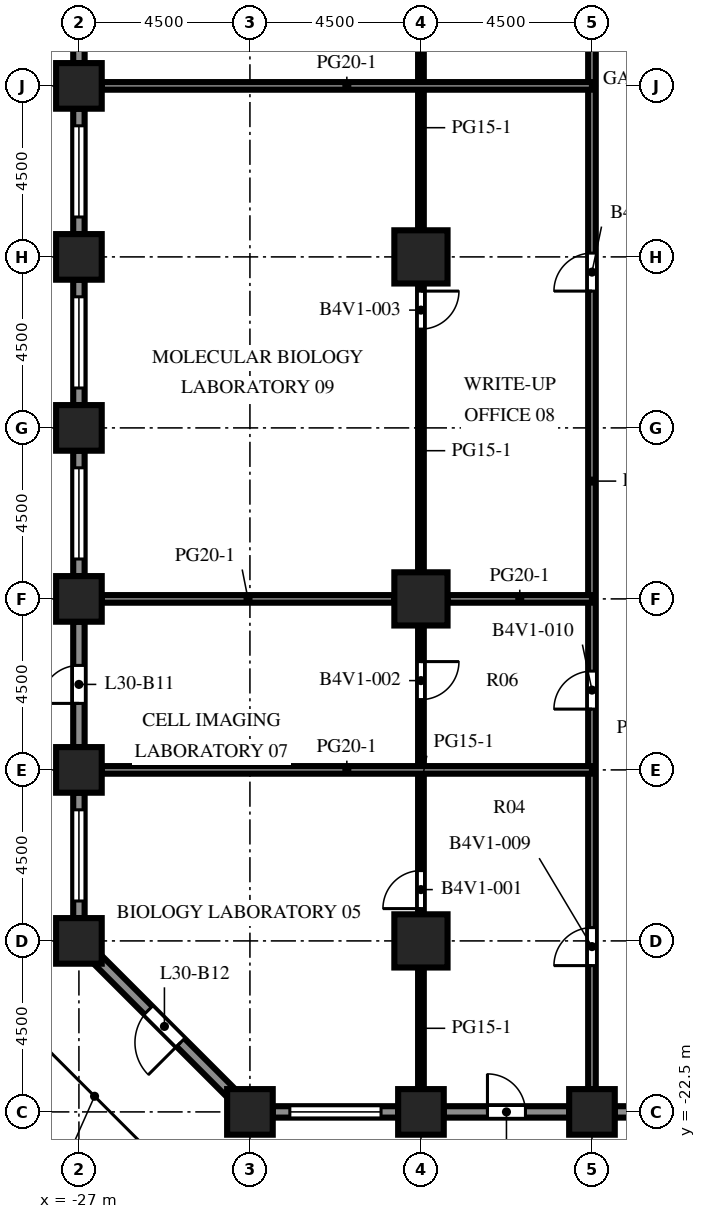
"""IFC4 building model, lengths in metres.
Left out: names, types, materials, properties, quantities, classifications, styles, units other than length and angle.
Written with IfcOpenShell. Run it as: python <this file> out.ifc"""

import sys

from ifc_helpers import new_model, si_unit, direction, frame, frame_2d, origin, origin_2d, place, context, subcontext, project, spatial, rectangle, extrude, element, fill, save


model = new_model("IFC4")
c1 = context("Model", 3, precision=1e-05, world=origin(), true_north=direction((0.0, 1.0)))
c2 = subcontext(c1, "Body", "Model", "MODEL_VIEW")
j1 = project(units=[si_unit("LENGTHUNIT", "METRE"), si_unit("PLANEANGLEUNIT", "RADIAN")], contexts=[c1])
p1 = place(None, origin())
s1 = spatial("IfcSite", under=j1, at=p1, CompositionType="ELEMENT")
p2 = place(p1, origin())
s2 = spatial("IfcBuilding", under=s1, at=p2, CompositionType="ELEMENT")
p3 = place(p2, frame((0.0, 0.0, 133.1)))
s3 = spatial("IfcBuildingStorey", under=s2, at=p3, CompositionType="ELEMENT", Elevation=133.1)
for number, where, z_axis, x_axis in (
    (1, (-27.0, -18.0, 0.0), (0.0, 0.0, 1.0), (1.0, 0.0, 0.0)),
    (2, (-27.0, -13.5, 0.0), (0.0, 0.0, 1.0), (1.0, 0.0, 0.0)),
    (3, (-27.0, -9.0, 0.0), (0.0, 0.0, 1.0), (1.0, 0.0, 0.0)),
    (4, (-27.0, -4.5, 0.0), (0.0, 0.0, 1.0), (1.0, 0.0, 0.0)),
    (5, (-27.0, 0.0, 0.0), (0.0, 0.0, 1.0), (1.0, 0.0, 0.0)),
    (6, (-27.0, 4.5, 0.0), (0.0, 0.0, 1.0), (1.0, 0.0, 0.0)),
    (7, (-22.5, -22.5, 0.0), (0.0, 0.0, 1.0), (1.0, 0.0, 0.0)),
    (8, (-18.0, -22.5, 0.0), (0.0, 0.0, 1.0), (1.0, 0.0, 0.0)),
    (9, (-13.5, -22.5, 0.0), (0.0, 0.0, 1.0), (1.0, 0.0, 0.0)),
):
    element("IfcColumn", number, at=place(p3, frame(where, z_axis=z_axis, x_axis=x_axis)), inside=s3, PredefinedType="COLUMN", context=c2, shape_type="SweptSolid", body=[
        extrude(rectangle(XDim=1.2, YDim=1.2, at=origin_2d()), origin(), (0.0, 0.0, 1.0), 4.1),
    ])
for number, where, z_axis, x_axis in (
    (10, (-18.0, -18.0, 0.0), (0.0, 0.0, 1.0), (1.0, 0.0, 0.0)),
    (11, (-18.0, -9.0, 0.0), (0.0, 0.0, 1.0), (1.0, 0.0, 0.0)),
    (12, (-18.0, 0.0, 0.0), (0.0, 0.0, 1.0), (1.0, 0.0, 0.0)),
):
    element("IfcColumn", number, at=place(p3, frame(where, z_axis=z_axis, x_axis=x_axis)), inside=s3, PredefinedType="COLUMN", context=c2, shape_type="SweptSolid", body=[
        extrude(rectangle(XDim=1.4, YDim=1.4, at=origin_2d()), origin(), (0.0, 0.0, 1.0), 4.1),
    ])
p4 = place(p3, frame((-18.6, -22.5, 0.0), z_axis=(0.0, 0.0, 1.0), x_axis=(-1.0, 0.0, 0.0)))
e13 = element("IfcWall", 13, at=p4, inside=s3, PredefinedType="SOLIDWALL", context=c2, shape_type="SweptSolid", body=[
    extrude(rectangle(XDim=3.3, YDim=0.3, at=frame_2d((1.65, 0.0))), origin(), (0.0, 0.0, 1.0), 2.75),
])
p5 = place(p4, frame((0.45, 0.0, 0.8)))
e14 = element("IfcOpeningElement", 14, at=p5, cuts=e13, PredefinedType="OPENING", context=c2, shape_type="SweptSolid", body=[
    extrude(rectangle(XDim=2.4, YDim=1.7, at=frame_2d((1.2, 0.85))), frame((0.0, 0.16, 0.0), z_axis=(0.0, -1.0, 0.0), x_axis=(1.0, 0.0, 0.0)), (0.0, 0.0, 1.0), 0.32),
])
p6 = place(p3, frame((-14.1, -22.5, 0.0), z_axis=(0.0, 0.0, 1.0), x_axis=(-1.0, 0.0, 0.0)))
e15 = element("IfcWall", 15, at=p6, inside=s3, PredefinedType="SOLIDWALL", context=c2, shape_type="SweptSolid", body=[
    extrude(rectangle(XDim=3.3, YDim=0.3, at=frame_2d((1.65, 0.0))), origin(), (0.0, 0.0, 1.0), 2.75),
])
p7 = place(p6, frame((1.15, 0.0, 0.0)))
e16 = element("IfcOpeningElement", 16, at=p7, cuts=e15, PredefinedType="OPENING", context=c2, shape_type="SweptSolid", body=[
    extrude(rectangle(XDim=1.0, YDim=2.2, at=frame_2d((0.5, 1.1))), frame((0.0, 0.16, 0.0), z_axis=(0.0, -1.0, 0.0), x_axis=(1.0, 0.0, 0.0)), (0.0, 0.0, 1.0), 0.32),
])
p8 = place(p3, frame((-9.6, -22.5, 0.0), z_axis=(0.0, 0.0, 1.0), x_axis=(-1.0, 0.0, 0.0)))
e17 = element("IfcWall", 17, at=p8, inside=s3, PredefinedType="SOLIDWALL", context=c2, shape_type="SweptSolid", body=[
    extrude(rectangle(XDim=3.3, YDim=0.3, at=frame_2d((1.65, 0.0))), origin(), (0.0, 0.0, 1.0), 2.75),
])
p9 = place(p8, frame((1.575, 0.0, 0.8)))
e18 = element("IfcOpeningElement", 18, at=p9, cuts=e17, PredefinedType="OPENING", context=c2, shape_type="SweptSolid", body=[
    extrude(rectangle(XDim=1.2, YDim=1.7, at=frame_2d((0.6, 0.85))), frame((0.0, 0.16, 0.0), z_axis=(0.0, -1.0, 0.0), x_axis=(1.0, 0.0, 0.0)), (0.0, 0.0, 1.0), 0.32),
])
p10 = place(p3, frame((-27.0, 5.1, 0.0), z_axis=(0.0, 0.0, 1.0), x_axis=(0.0, 1.0, 0.0)))
e19 = element("IfcWall", 19, at=p10, inside=s3, PredefinedType="SOLIDWALL", context=c2, shape_type="SweptSolid", body=[
    extrude(rectangle(XDim=3.3, YDim=0.3, at=frame_2d((1.65, 0.0))), origin(), (0.0, 0.0, 1.0), 2.75),
])
p11 = place(p10, frame((0.45, 0.0, 0.8)))
e20 = element("IfcOpeningElement", 20, at=p11, cuts=e19, PredefinedType="OPENING", context=c2, shape_type="SweptSolid", body=[
    extrude(rectangle(XDim=2.4, YDim=1.7, at=frame_2d((1.2, 0.85))), frame((0.0, 0.16, 0.0), z_axis=(0.0, -1.0, 0.0), x_axis=(1.0, 0.0, 0.0)), (0.0, 0.0, 1.0), 0.32),
])
p12 = place(p3, frame((-27.0, 0.6, 0.0), z_axis=(0.0, 0.0, 1.0), x_axis=(0.0, 1.0, 0.0)))
e21 = element("IfcWall", 21, at=p12, inside=s3, PredefinedType="SOLIDWALL", context=c2, shape_type="SweptSolid", body=[
    extrude(rectangle(XDim=3.3, YDim=0.3, at=frame_2d((1.65, 0.0))), origin(), (0.0, 0.0, 1.0), 2.75),
])
p13 = place(p12, frame((0.45, 0.0, 0.8)))
e22 = element("IfcOpeningElement", 22, at=p13, cuts=e21, PredefinedType="OPENING", context=c2, shape_type="SweptSolid", body=[
    extrude(rectangle(XDim=2.4, YDim=1.7, at=frame_2d((1.2, 0.85))), frame((0.0, 0.16, 0.0), z_axis=(0.0, -1.0, 0.0), x_axis=(1.0, 0.0, 0.0)), (0.0, 0.0, 1.0), 0.32),
])
p14 = place(p3, frame((-27.0, -3.9, 0.0), z_axis=(0.0, 0.0, 1.0), x_axis=(0.0, 1.0, 0.0)))
e23 = element("IfcWall", 23, at=p14, inside=s3, PredefinedType="SOLIDWALL", context=c2, shape_type="SweptSolid", body=[
    extrude(rectangle(XDim=3.3, YDim=0.3, at=frame_2d((1.65, 0.0))), origin(), (0.0, 0.0, 1.0), 2.75),
])
p15 = place(p14, frame((0.45, 0.0, 0.8)))
e24 = element("IfcOpeningElement", 24, at=p15, cuts=e23, PredefinedType="OPENING", context=c2, shape_type="SweptSolid", body=[
    extrude(rectangle(XDim=2.4, YDim=1.7, at=frame_2d((1.2, 0.85))), frame((0.0, 0.16, 0.0), z_axis=(0.0, -1.0, 0.0), x_axis=(1.0, 0.0, 0.0)), (0.0, 0.0, 1.0), 0.32),
])
p16 = place(p3, frame((-27.0, -8.4, 0.0), z_axis=(0.0, 0.0, 1.0), x_axis=(0.0, 1.0, 0.0)))
e25 = element("IfcWall", 25, at=p16, inside=s3, PredefinedType="SOLIDWALL", context=c2, shape_type="SweptSolid", body=[
    extrude(rectangle(XDim=3.3, YDim=0.3, at=frame_2d((1.65, 0.0))), origin(), (0.0, 0.0, 1.0), 2.75),
])
p17 = place(p16, frame((0.45, 0.0, 0.8)))
e26 = element("IfcOpeningElement", 26, at=p17, cuts=e25, PredefinedType="OPENING", context=c2, shape_type="SweptSolid", body=[
    extrude(rectangle(XDim=2.4, YDim=1.7, at=frame_2d((1.2, 0.85))), frame((0.0, 0.16, 0.0), z_axis=(0.0, -1.0, 0.0), x_axis=(1.0, 0.0, 0.0)), (0.0, 0.0, 1.0), 0.32),
])
p18 = place(p3, frame((-27.0, -12.9, 0.0), z_axis=(0.0, 0.0, 1.0), x_axis=(0.0, 1.0, 0.0)))
e27 = element("IfcWall", 27, at=p18, inside=s3, PredefinedType="SOLIDWALL", context=c2, shape_type="SweptSolid", body=[
    extrude(rectangle(XDim=3.3, YDim=0.3, at=frame_2d((1.65, 0.0))), origin(), (0.0, 0.0, 1.0), 2.75),
])
p19 = place(p18, frame((1.15, 0.0, 0.0)))
e28 = element("IfcOpeningElement", 28, at=p19, cuts=e27, PredefinedType="OPENING", context=c2, shape_type="SweptSolid", body=[
    extrude(rectangle(XDim=1.0, YDim=2.2, at=frame_2d((0.5, 1.1))), frame((0.0, 0.16, 0.0), z_axis=(0.0, -1.0, 0.0), x_axis=(1.0, 0.0, 0.0)), (0.0, 0.0, 1.0), 0.32),
])
p20 = place(p3, frame((-27.0, -17.4, 0.0), z_axis=(0.0, 0.0, 1.0), x_axis=(0.0, 1.0, 0.0)))
e29 = element("IfcWall", 29, at=p20, inside=s3, PredefinedType="SOLIDWALL", context=c2, shape_type="SweptSolid", body=[
    extrude(rectangle(XDim=3.3, YDim=0.3, at=frame_2d((1.65, 0.0))), origin(), (0.0, 0.0, 1.0), 2.75),
])
p21 = place(p20, frame((0.45, 0.0, 0.8)))
e30 = element("IfcOpeningElement", 30, at=p21, cuts=e29, PredefinedType="OPENING", context=c2, shape_type="SweptSolid", body=[
    extrude(rectangle(XDim=2.4, YDim=1.7, at=frame_2d((1.2, 0.85))), frame((0.0, 0.16, 0.0), z_axis=(0.0, -1.0, 0.0), x_axis=(1.0, 0.0, 0.0)), (0.0, 0.0, 1.0), 0.32),
])
p22 = place(p3, frame((-22.994, -22.006, 0.0), z_axis=(0.0, 0.0, 1.0), x_axis=(-0.707106781187, 0.707106781187, 0.0)))
e31 = element("IfcWall", 31, at=p22, inside=s3, PredefinedType="SOLIDWALL", context=c2, shape_type="SweptSolid", body=[
    extrude(rectangle(XDim=4.967, YDim=0.3, at=frame_2d((2.483, 0.0))), origin(), (0.0, 0.0, 1.0), 2.75),
])
p23 = place(p22, frame((1.884, 0.0, 0.0)))
e32 = element("IfcOpeningElement", 32, at=p23, cuts=e31, PredefinedType="OPENING", context=c2, shape_type="SweptSolid", body=[
    extrude(rectangle(XDim=1.2, YDim=2.2, at=frame_2d((0.6, 1.1))), frame((0.0, 0.16, 0.0), z_axis=(0.0, -1.0, 0.0), x_axis=(1.0, 0.0, 0.0)), (0.0, 0.0, 1.0), 0.32),
])
p24 = place(p3, frame((-18.0, -21.9, 0.0), z_axis=(0.0, 0.0, 1.0), x_axis=(0.0, 1.0, 0.0)))
e33 = element("IfcWall", 33, at=p24, inside=s3, PredefinedType="PARTITIONING", context=c2, shape_type="SweptSolid", body=[
    extrude(rectangle(XDim=3.2, YDim=0.15, at=frame_2d((1.6, 0.0))), origin(), (0.0, 0.0, 1.0), 3.65),
])
p25 = place(p3, frame((-18.0, -17.3, 0.0), z_axis=(0.0, 0.0, 1.0), x_axis=(0.0, 1.0, 0.0)))
e34 = element("IfcWall", 34, at=p25, inside=s3, PredefinedType="PARTITIONING", context=c2, shape_type="SweptSolid", body=[
    extrude(rectangle(XDim=7.6, YDim=0.15, at=frame_2d((3.8, 0.0))), origin(), (0.0, 0.0, 1.0), 3.65),
])
p26 = place(p25, frame((0.15, 0.0, 0.0)))
e35 = element("IfcOpeningElement", 35, at=p26, cuts=e34, PredefinedType="OPENING", context=c2, shape_type="SweptSolid", body=[
    extrude(rectangle(XDim=1.0, YDim=2.1, at=frame_2d((0.5, 1.05))), frame((0.0, 0.085, 0.0), z_axis=(0.0, -1.0, 0.0), x_axis=(1.0, 0.0, 0.0)), (0.0, 0.0, 1.0), 0.17),
])
p27 = place(p25, frame((5.65, 0.0, 0.0)))
e36 = element("IfcOpeningElement", 36, at=p27, cuts=e34, PredefinedType="OPENING", context=c2, shape_type="SweptSolid", body=[
    extrude(rectangle(XDim=1.0, YDim=2.1, at=frame_2d((0.5, 1.05))), frame((0.0, 0.085, 0.0), z_axis=(0.0, -1.0, 0.0), x_axis=(1.0, 0.0, 0.0)), (0.0, 0.0, 1.0), 0.17),
])
p28 = place(p3, frame((-18.0, -8.3, 0.0), z_axis=(0.0, 0.0, 1.0), x_axis=(0.0, 1.0, 0.0)))
e37 = element("IfcWall", 37, at=p28, inside=s3, PredefinedType="PARTITIONING", context=c2, shape_type="SweptSolid", body=[
    extrude(rectangle(XDim=7.6, YDim=0.15, at=frame_2d((3.8, 0.0))), origin(), (0.0, 0.0, 1.0), 3.65),
])
p29 = place(p28, frame((6.4, 0.0, 0.0)))
e38 = element("IfcOpeningElement", 38, at=p29, cuts=e37, PredefinedType="OPENING", context=c2, shape_type="SweptSolid", body=[
    extrude(rectangle(XDim=1.0, YDim=2.1, at=frame_2d((0.5, 1.05))), frame((0.0, 0.085, 0.0), z_axis=(0.0, -1.0, 0.0), x_axis=(1.0, 0.0, 0.0)), (0.0, 0.0, 1.0), 0.17),
])
p30 = place(p3, frame((-18.0, 0.7, 0.0), z_axis=(0.0, 0.0, 1.0), x_axis=(0.0, 1.0, 0.0)))
e39 = element("IfcWall", 39, at=p30, inside=s3, PredefinedType="PARTITIONING", context=c2, shape_type="SweptSolid", body=[
    extrude(rectangle(XDim=7.6, YDim=0.15, at=frame_2d((3.8, 0.0))), origin(), (0.0, 0.0, 1.0), 3.65),
])
p31 = place(p30, frame((5.4, 0.0, 0.0)))
e40 = element("IfcOpeningElement", 40, at=p31, cuts=e39, PredefinedType="OPENING", context=c2, shape_type="SweptSolid", body=[
    extrude(rectangle(XDim=1.0, YDim=2.1, at=frame_2d((0.5, 1.05))), frame((0.0, 0.085, 0.0), z_axis=(0.0, -1.0, 0.0), x_axis=(1.0, 0.0, 0.0)), (0.0, 0.0, 1.0), 0.17),
])
p32 = place(p3, frame((-13.5, -21.9, 0.0), z_axis=(0.0, 0.0, 1.0), x_axis=(0.0, 1.0, 0.0)))
e41 = element("IfcWall", 41, at=p32, inside=s3, PredefinedType="PARTITIONING", context=c2, shape_type="SweptSolid", body=[
    extrude(rectangle(XDim=52.8, YDim=0.2, at=frame_2d((26.4, 0.0))), origin(), (0.0, 0.0, 1.0), 3.65),
])
p33 = place(p32, frame((3.25, 0.0, 0.0)))
e42 = element("IfcOpeningElement", 42, at=p33, cuts=e41, PredefinedType="OPENING", context=c2, shape_type="SweptSolid", body=[
    extrude(rectangle(XDim=1.0, YDim=2.1, at=frame_2d((0.5, 1.05))), frame((0.0, 0.11, 0.0), z_axis=(0.0, -1.0, 0.0), x_axis=(1.0, 0.0, 0.0)), (0.0, 0.0, 1.0), 0.22),
])
p34 = place(p32, frame((10.0, 0.0, 0.0)))
e43 = element("IfcOpeningElement", 43, at=p34, cuts=e41, PredefinedType="OPENING", context=c2, shape_type="SweptSolid", body=[
    extrude(rectangle(XDim=1.0, YDim=2.1, at=frame_2d((0.5, 1.05))), frame((0.0, 0.11, 0.0), z_axis=(0.0, -1.0, 0.0), x_axis=(1.0, 0.0, 0.0)), (0.0, 0.0, 1.0), 0.22),
])
p35 = place(p32, frame((21.0, 0.0, 0.0)))
e44 = element("IfcOpeningElement", 44, at=p35, cuts=e41, PredefinedType="OPENING", context=c2, shape_type="SweptSolid", body=[
    extrude(rectangle(XDim=1.0, YDim=2.1, at=frame_2d((0.5, 1.05))), frame((0.0, 0.11, 0.0), z_axis=(0.0, -1.0, 0.0), x_axis=(1.0, 0.0, 0.0)), (0.0, 0.0, 1.0), 0.22),
])
p36 = place(p32, frame((27.75, 0.0, 0.0)))
e45 = element("IfcOpeningElement", 45, at=p36, cuts=e41, PredefinedType="OPENING", context=c2, shape_type="SweptSolid", body=[
    extrude(rectangle(XDim=1.0, YDim=2.1, at=frame_2d((0.5, 1.05))), frame((0.0, 0.11, 0.0), z_axis=(0.0, -1.0, 0.0), x_axis=(1.0, 0.0, 0.0)), (0.0, 0.0, 1.0), 0.22),
])
p37 = place(p32, frame((34.75, 0.0, 0.0)))
e46 = element("IfcOpeningElement", 46, at=p37, cuts=e41, PredefinedType="OPENING", context=c2, shape_type="SweptSolid", body=[
    extrude(rectangle(XDim=1.0, YDim=2.1, at=frame_2d((0.5, 1.05))), frame((0.0, 0.11, 0.0), z_axis=(0.0, -1.0, 0.0), x_axis=(1.0, 0.0, 0.0)), (0.0, 0.0, 1.0), 0.22),
])
p38 = place(p32, frame((42.0, 0.0, 0.0)))
e47 = element("IfcOpeningElement", 47, at=p38, cuts=e41, PredefinedType="OPENING", context=c2, shape_type="SweptSolid", body=[
    extrude(rectangle(XDim=1.0, YDim=2.1, at=frame_2d((0.5, 1.05))), frame((0.0, 0.11, 0.0), z_axis=(0.0, -1.0, 0.0), x_axis=(1.0, 0.0, 0.0)), (0.0, 0.0, 1.0), 0.22),
])
p39 = place(p32, frame((46.25, 0.0, 0.0)))
e48 = element("IfcOpeningElement", 48, at=p39, cuts=e41, PredefinedType="OPENING", context=c2, shape_type="SweptSolid", body=[
    extrude(rectangle(XDim=1.0, YDim=2.1, at=frame_2d((0.5, 1.05))), frame((0.0, 0.11, 0.0), z_axis=(0.0, -1.0, 0.0), x_axis=(1.0, 0.0, 0.0)), (0.0, 0.0, 1.0), 0.22),
])
p40 = place(p32, frame((51.0, 0.0, 0.0)))
e49 = element("IfcOpeningElement", 49, at=p40, cuts=e41, PredefinedType="OPENING", context=c2, shape_type="SweptSolid", body=[
    extrude(rectangle(XDim=1.0, YDim=2.1, at=frame_2d((0.5, 1.05))), frame((0.0, 0.11, 0.0), z_axis=(0.0, -1.0, 0.0), x_axis=(1.0, 0.0, 0.0)), (0.0, 0.0, 1.0), 0.22),
])
p41 = place(p3, frame((-26.4, -13.5, 0.0), z_axis=(0.0, 0.0, 1.0), x_axis=(1.0, 0.0, 0.0)))
e50 = element("IfcWall", 50, at=p41, inside=s3, PredefinedType="PARTITIONING", context=c2, shape_type="SweptSolid", body=[
    extrude(rectangle(XDim=12.9, YDim=0.2, at=frame_2d((6.45, 0.0))), origin(), (0.0, 0.0, 1.0), 3.65),
])
p42 = place(p3, frame((-26.4, -9.0, 0.0), z_axis=(0.0, 0.0, 1.0), x_axis=(1.0, 0.0, 0.0)))
e51 = element("IfcWall", 51, at=p42, inside=s3, PredefinedType="PARTITIONING", context=c2, shape_type="SweptSolid", body=[
    extrude(rectangle(XDim=7.7, YDim=0.2, at=frame_2d((3.85, 0.0))), origin(), (0.0, 0.0, 1.0), 3.65),
])
p43 = place(p3, frame((-17.3, -9.0, 0.0), z_axis=(0.0, 0.0, 1.0), x_axis=(1.0, 0.0, 0.0)))
e52 = element("IfcWall", 52, at=p43, inside=s3, PredefinedType="PARTITIONING", context=c2, shape_type="SweptSolid", body=[
    extrude(rectangle(XDim=3.8, YDim=0.2, at=frame_2d((1.9, 0.0))), origin(), (0.0, 0.0, 1.0), 3.65),
])
p44 = place(p3, frame((-26.4, 4.5, 0.0), z_axis=(0.0, 0.0, 1.0), x_axis=(1.0, 0.0, 0.0)))
e53 = element("IfcWall", 53, at=p44, inside=s3, PredefinedType="PARTITIONING", context=c2, shape_type="SweptSolid", body=[
    extrude(rectangle(XDim=12.9, YDim=0.2, at=frame_2d((6.45, 0.0))), origin(), (0.0, 0.0, 1.0), 3.65),
])
p45 = place(p5, origin())
e54 = element("IfcWindow", 54, at=p45, inside=s3, PartitioningType="SINGLE_PANEL", PredefinedType="WINDOW", context=c2, shape_type="SweptSolid", body=[
    extrude(rectangle(XDim=2.4, YDim=1.7, at=frame_2d((1.2, 0.85))), frame((0.0, 0.03, 0.0), z_axis=(0.0, -1.0, 0.0), x_axis=(1.0, 0.0, 0.0)), (0.0, 0.0, 1.0), 0.06),
])
fill(e14, e54)
p46 = place(p7, origin())
e55 = element("IfcDoor", 55, at=p46, inside=s3, OperationType="SINGLE_SWING_RIGHT", PredefinedType="DOOR", context=c2, shape_type="SweptSolid", body=[
    extrude(rectangle(XDim=1.0, YDim=2.2, at=frame_2d((0.5, 1.1))), frame((0.0, 0.025, 0.0), z_axis=(0.0, -1.0, 0.0), x_axis=(1.0, 0.0, 0.0)), (0.0, 0.0, 1.0), 0.05),
])
fill(e16, e55)
p47 = place(p13, origin())
e56 = element("IfcWindow", 56, at=p47, inside=s3, PartitioningType="SINGLE_PANEL", PredefinedType="WINDOW", context=c2, shape_type="SweptSolid", body=[
    extrude(rectangle(XDim=2.4, YDim=1.7, at=frame_2d((1.2, 0.85))), frame((0.0, 0.03, 0.0), z_axis=(0.0, -1.0, 0.0), x_axis=(1.0, 0.0, 0.0)), (0.0, 0.0, 1.0), 0.06),
])
fill(e22, e56)
p48 = place(p15, origin())
e57 = element("IfcWindow", 57, at=p48, inside=s3, PartitioningType="SINGLE_PANEL", PredefinedType="WINDOW", context=c2, shape_type="SweptSolid", body=[
    extrude(rectangle(XDim=2.4, YDim=1.7, at=frame_2d((1.2, 0.85))), frame((0.0, 0.03, 0.0), z_axis=(0.0, -1.0, 0.0), x_axis=(1.0, 0.0, 0.0)), (0.0, 0.0, 1.0), 0.06),
])
fill(e24, e57)
p49 = place(p17, origin())
e58 = element("IfcWindow", 58, at=p49, inside=s3, PartitioningType="SINGLE_PANEL", PredefinedType="WINDOW", context=c2, shape_type="SweptSolid", body=[
    extrude(rectangle(XDim=2.4, YDim=1.7, at=frame_2d((1.2, 0.85))), frame((0.0, 0.03, 0.0), z_axis=(0.0, -1.0, 0.0), x_axis=(1.0, 0.0, 0.0)), (0.0, 0.0, 1.0), 0.06),
])
fill(e26, e58)
p50 = place(p19, origin())
e59 = element("IfcDoor", 59, at=p50, inside=s3, OperationType="SINGLE_SWING_LEFT", PredefinedType="DOOR", context=c2, shape_type="SweptSolid", body=[
    extrude(rectangle(XDim=1.0, YDim=2.2, at=frame_2d((0.5, 1.1))), frame((0.0, 0.025, 0.0), z_axis=(0.0, -1.0, 0.0), x_axis=(1.0, 0.0, 0.0)), (0.0, 0.0, 1.0), 0.05),
])
fill(e28, e59)
p51 = place(p21, origin())
e60 = element("IfcWindow", 60, at=p51, inside=s3, PartitioningType="SINGLE_PANEL", PredefinedType="WINDOW", context=c2, shape_type="SweptSolid", body=[
    extrude(rectangle(XDim=2.4, YDim=1.7, at=frame_2d((1.2, 0.85))), frame((0.0, 0.03, 0.0), z_axis=(0.0, -1.0, 0.0), x_axis=(1.0, 0.0, 0.0)), (0.0, 0.0, 1.0), 0.06),
])
fill(e30, e60)
p52 = place(p23, origin())
e61 = element("IfcDoor", 61, at=p52, inside=s3, OperationType="SINGLE_SWING_LEFT", PredefinedType="DOOR", context=c2, shape_type="SweptSolid", body=[
    extrude(rectangle(XDim=1.2, YDim=2.2, at=frame_2d((0.6, 1.1))), frame((0.0, 0.025, 0.0), z_axis=(0.0, -1.0, 0.0), x_axis=(1.0, 0.0, 0.0)), (0.0, 0.0, 1.0), 0.05),
])
fill(e32, e61)
p53 = place(p26, origin())
e62 = element("IfcDoor", 62, at=p53, inside=s3, OperationType="SINGLE_SWING_LEFT", PredefinedType="DOOR", context=c2, shape_type="SweptSolid", body=[
    extrude(rectangle(XDim=1.0, YDim=2.1, at=frame_2d((0.5, 1.05))), frame((0.0, 0.025, 0.0), z_axis=(0.0, -1.0, 0.0), x_axis=(1.0, 0.0, 0.0)), (0.0, 0.0, 1.0), 0.05),
])
fill(e35, e62)
p54 = place(p27, origin())
e63 = element("IfcDoor", 63, at=p54, inside=s3, OperationType="SINGLE_SWING_RIGHT", PredefinedType="DOOR", context=c2, shape_type="SweptSolid", body=[
    extrude(rectangle(XDim=1.0, YDim=2.1, at=frame_2d((0.5, 1.05))), frame((0.0, 0.025, 0.0), z_axis=(0.0, -1.0, 0.0), x_axis=(1.0, 0.0, 0.0)), (0.0, 0.0, 1.0), 0.05),
])
fill(e36, e63)
p55 = place(p29, origin())
e64 = element("IfcDoor", 64, at=p55, inside=s3, OperationType="SINGLE_SWING_RIGHT", PredefinedType="DOOR", context=c2, shape_type="SweptSolid", body=[
    extrude(rectangle(XDim=1.0, YDim=2.1, at=frame_2d((0.5, 1.05))), frame((0.0, 0.025, 0.0), z_axis=(0.0, -1.0, 0.0), x_axis=(1.0, 0.0, 0.0)), (0.0, 0.0, 1.0), 0.05),
])
fill(e38, e64)
p56 = place(p33, origin())
e65 = element("IfcDoor", 65, at=p56, inside=s3, OperationType="SINGLE_SWING_LEFT", PredefinedType="DOOR", context=c2, shape_type="SweptSolid", body=[
    extrude(rectangle(XDim=1.0, YDim=2.1, at=frame_2d((0.5, 1.05))), frame((0.0, 0.025, 0.0), z_axis=(0.0, -1.0, 0.0), x_axis=(1.0, 0.0, 0.0)), (0.0, 0.0, 1.0), 0.05),
])
fill(e42, e65)
p57 = place(p34, origin())
e66 = element("IfcDoor", 66, at=p57, inside=s3, OperationType="SINGLE_SWING_LEFT", PredefinedType="DOOR", context=c2, shape_type="SweptSolid", body=[
    extrude(rectangle(XDim=1.0, YDim=2.1, at=frame_2d((0.5, 1.05))), frame((0.0, 0.025, 0.0), z_axis=(0.0, -1.0, 0.0), x_axis=(1.0, 0.0, 0.0)), (0.0, 0.0, 1.0), 0.05),
])
fill(e43, e66)
p58 = place(p35, origin())
e67 = element("IfcDoor", 67, at=p58, inside=s3, OperationType="SINGLE_SWING_LEFT", PredefinedType="DOOR", context=c2, shape_type="SweptSolid", body=[
    extrude(rectangle(XDim=1.0, YDim=2.1, at=frame_2d((0.5, 1.05))), frame((0.0, 0.025, 0.0), z_axis=(0.0, -1.0, 0.0), x_axis=(1.0, 0.0, 0.0)), (0.0, 0.0, 1.0), 0.05),
])
fill(e44, e67)
save(model, sys.argv[1])
